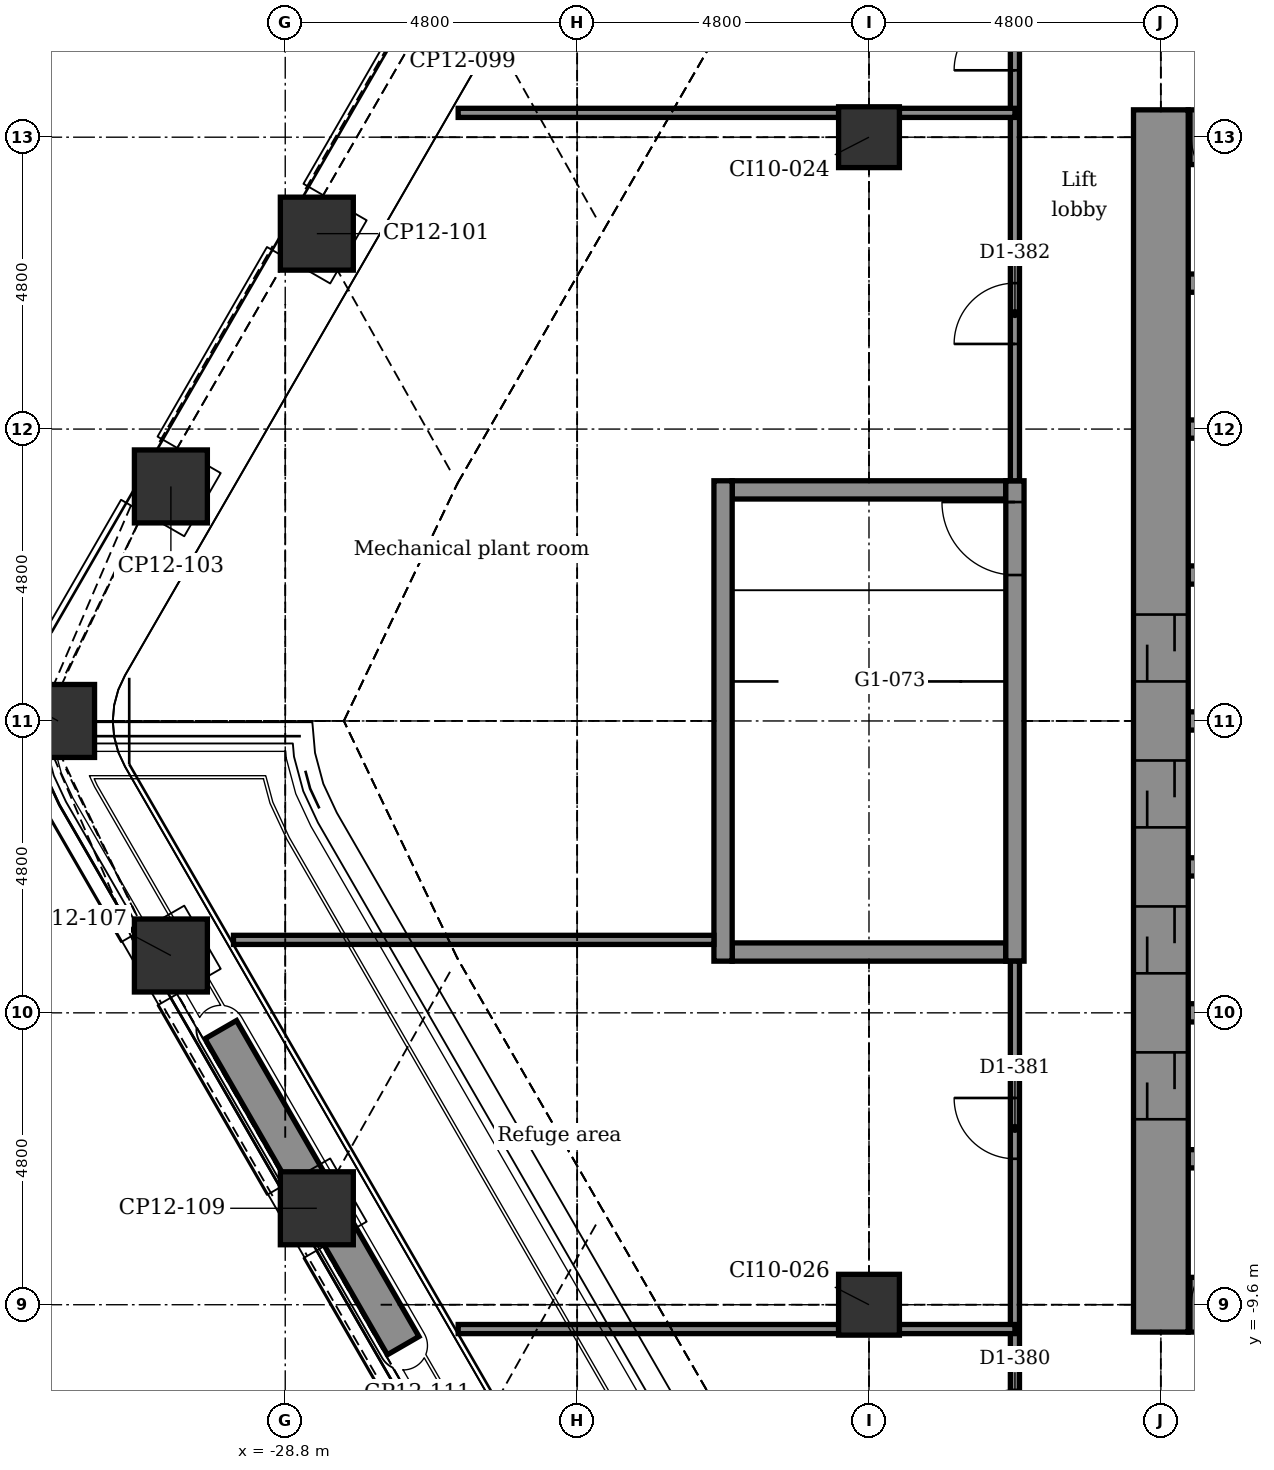
"""IFC4 building model, lengths in metres.
Left out: names, types, materials, properties, quantities, classifications, styles, units other than length and angle.
Written with IfcOpenShell. Run it as: python <this file> out.ifc"""

import sys

from ifc_helpers import new_model, si_unit, direction, frame, frame_2d, origin, origin_2d, place, context, subcontext, project, spatial, rectangle, extrude, element, fill, save


model = new_model("IFC4")
c1 = context("Model", 3, precision=1e-05, world=origin(), true_north=direction((0.0, 1.0)))
c2 = subcontext(c1, "Body", "Model", "MODEL_VIEW")
j1 = project(units=[si_unit("LENGTHUNIT", "METRE"), si_unit("PLANEANGLEUNIT", "RADIAN")], contexts=[c1])
p1 = place(None, origin())
s1 = spatial("IfcSite", under=j1, at=p1, CompositionType="ELEMENT")
p2 = place(p1, origin())
s2 = spatial("IfcBuilding", under=s1, at=p2, CompositionType="ELEMENT")
p3 = place(p2, frame((0.0, 0.0, 127.4)))
s3 = spatial("IfcBuildingStorey", under=s2, at=p3, CompositionType="ELEMENT", Elevation=127.4)
for number, where, z_axis, x_axis in (
    (1, (-28.28, -8.014, -0.3), (0.0, 0.0, 1.0), (0.866, 0.5, 0.0)),
    (2, (-30.68, -3.857, -0.3), (0.0, 0.0, 1.0), (0.866, 0.5, 0.0)),
    (3, (-32.536, 0.0, -0.3), (0.0, 0.0, 1.0), (1.0, 0.0, 0.0)),
    (4, (-30.68, 3.857, -0.3), (0.0, 0.0, 1.0), (0.5, 0.866, 0.0)),
    (5, (-28.28, 8.014, -0.3), (0.0, 0.0, 1.0), (0.5, 0.866, 0.0)),
):
    element("IfcColumn", number, at=place(p3, frame(where, z_axis=z_axis, x_axis=x_axis)), inside=s3, PredefinedType="COLUMN", context=c2, shape_type="SweptSolid", body=[
        extrude(rectangle(XDim=1.2, YDim=1.2, at=origin_2d()), origin(), (0.0, 0.0, 1.0), 6.15),
    ])
for number, where, z_axis, x_axis in (
    (6, (-19.2, -9.6, -0.3), (0.0, 0.0, 1.0), (1.0, 0.0, 0.0)),
    (7, (-19.2, 9.6, -0.3), (0.0, 0.0, 1.0), (1.0, 0.0, 0.0)),
):
    element("IfcColumn", number, at=place(p3, frame(where, z_axis=z_axis, x_axis=x_axis)), inside=s3, PredefinedType="COLUMN", context=c2, shape_type="SweptSolid", body=[
        extrude(rectangle(XDim=1.0, YDim=1.0, at=origin_2d()), origin(), (0.0, 0.0, 1.0), 6.15),
    ])
p4 = place(p3, frame((-13.95, -9.6, -0.3), z_axis=(0.0, 0.0, 1.0), x_axis=(1.0, 0.0, 0.0)))
e8 = element("IfcWall", 8, at=p4, inside=s3, PredefinedType="SHEAR", context=c2, shape_type="SweptSolid", body=[
    extrude(rectangle(XDim=3.9, YDim=0.9, at=frame_2d((1.95, 0.0))), origin(), (0.0, 0.0, 1.0), 6.15),
])
p5 = place(p4, frame((0.05, 0.0, 0.3)))
e9 = element("IfcOpeningElement", 9, at=p5, cuts=e8, PredefinedType="OPENING", context=c2, shape_type="SweptSolid", body=[
    extrude(rectangle(XDim=0.9, YDim=2.1, at=frame_2d((0.45, 1.05))), frame((0.0, 0.46, 0.0), z_axis=(0.0, -1.0, 0.0), x_axis=(1.0, 0.0, 0.0)), (0.0, 0.0, 1.0), 0.92),
])
p6 = place(p4, frame((1.5, 0.0, 0.3)))
e10 = element("IfcOpeningElement", 10, at=p6, cuts=e8, PredefinedType="OPENING", context=c2, shape_type="SweptSolid", body=[
    extrude(rectangle(XDim=0.9, YDim=2.1, at=frame_2d((0.45, 1.05))), frame((0.0, 0.46, 0.0), z_axis=(0.0, -1.0, 0.0), x_axis=(1.0, 0.0, 0.0)), (0.0, 0.0, 1.0), 0.92),
])
p7 = place(p4, frame((2.95, 0.0, 0.3)))
e11 = element("IfcOpeningElement", 11, at=p7, cuts=e8, PredefinedType="OPENING", context=c2, shape_type="SweptSolid", body=[
    extrude(rectangle(XDim=0.9, YDim=2.1, at=frame_2d((0.45, 1.05))), frame((0.0, 0.46, 0.0), z_axis=(0.0, -1.0, 0.0), x_axis=(1.0, 0.0, 0.0)), (0.0, 0.0, 1.0), 0.92),
])
p8 = place(p3, frame((-13.95, -7.2, -0.3), z_axis=(0.0, 0.0, 1.0), x_axis=(1.0, 0.0, 0.0)))
e12 = element("IfcWall", 12, at=p8, inside=s3, PredefinedType="STANDARD", context=c2, shape_type="SweptSolid", body=[
    extrude(rectangle(XDim=3.9, YDim=0.3, at=frame_2d((1.95, 0.0))), origin(), (0.0, 0.0, 1.0), 6.15),
])
p9 = place(p3, frame((-13.95, -4.8, -0.3), z_axis=(0.0, 0.0, 1.0), x_axis=(1.0, 0.0, 0.0)))
e13 = element("IfcWall", 13, at=p9, inside=s3, PredefinedType="STANDARD", context=c2, shape_type="SweptSolid", body=[
    extrude(rectangle(XDim=3.9, YDim=0.3, at=frame_2d((1.95, 0.0))), origin(), (0.0, 0.0, 1.0), 4.7),
])
p10 = place(p3, frame((-21.45, -3.8, -0.3), z_axis=(0.0, 0.0, 1.0), x_axis=(1.0, 0.0, 0.0)))
e14 = element("IfcWall", 14, at=p10, inside=s3, PredefinedType="STANDARD", context=c2, shape_type="SweptSolid", body=[
    extrude(rectangle(XDim=4.5, YDim=0.3, at=frame_2d((2.25, 0.0))), origin(), (0.0, 0.0, 1.0), 6.15),
])
for number, where, z_axis, x_axis in (
    (15, (-13.95, -2.4, -0.3), (0.0, 0.0, 1.0), (1.0, 0.0, 0.0)),
    (16, (-13.95, 0.0, -0.3), (0.0, 0.0, 1.0), (1.0, 0.0, 0.0)),
):
    element("IfcWall", number, at=place(p3, frame(where, z_axis=z_axis, x_axis=x_axis)), inside=s3, PredefinedType="STANDARD", context=c2, shape_type="SweptSolid", body=[
        extrude(rectangle(XDim=2.8, YDim=0.3, at=frame_2d((1.4, 0.0))), origin(), (0.0, 0.0, 1.0), 4.7),
    ])
p11 = place(p3, frame((-13.95, 2.4, -0.3), z_axis=(0.0, 0.0, 1.0), x_axis=(1.0, 0.0, 0.0)))
e17 = element("IfcWall", 17, at=p11, inside=s3, PredefinedType="STANDARD", context=c2, shape_type="SweptSolid", body=[
    extrude(rectangle(XDim=2.8, YDim=0.3, at=frame_2d((1.4, 0.0))), origin(), (0.0, 0.0, 1.0), 6.15),
])
p12 = place(p3, frame((-21.45, 3.8, -0.3), z_axis=(0.0, 0.0, 1.0), x_axis=(1.0, 0.0, 0.0)))
e18 = element("IfcWall", 18, at=p12, inside=s3, PredefinedType="STANDARD", context=c2, shape_type="SweptSolid", body=[
    extrude(rectangle(XDim=4.5, YDim=0.3, at=frame_2d((2.25, 0.0))), origin(), (0.0, 0.0, 1.0), 6.15),
])
for number, where, z_axis, x_axis in (
    (19, (-13.95, 4.8, -0.3), (0.0, 0.0, 1.0), (1.0, 0.0, 0.0)),
    (20, (-13.95, 7.2, -0.3), (0.0, 0.0, 1.0), (1.0, 0.0, 0.0)),
):
    element("IfcWall", number, at=place(p3, frame(where, z_axis=z_axis, x_axis=x_axis)), inside=s3, PredefinedType="STANDARD", context=c2, shape_type="SweptSolid", body=[
        extrude(rectangle(XDim=3.9, YDim=0.3, at=frame_2d((1.95, 0.0))), origin(), (0.0, 0.0, 1.0), 6.15),
    ])
p13 = place(p3, frame((-13.95, 9.6, -0.3), z_axis=(0.0, 0.0, 1.0), x_axis=(1.0, 0.0, 0.0)))
e21 = element("IfcWall", 21, at=p13, inside=s3, PredefinedType="SHEAR", context=c2, shape_type="SweptSolid", body=[
    extrude(rectangle(XDim=3.9, YDim=0.9, at=frame_2d((1.95, 0.0))), origin(), (0.0, 0.0, 1.0), 6.15),
])
p14 = place(p13, frame((0.05, 0.0, 0.3)))
e22 = element("IfcOpeningElement", 22, at=p14, cuts=e21, PredefinedType="OPENING", context=c2, shape_type="SweptSolid", body=[
    extrude(rectangle(XDim=0.9, YDim=2.1, at=frame_2d((0.45, 1.05))), frame((0.0, 0.46, 0.0), z_axis=(0.0, -1.0, 0.0), x_axis=(1.0, 0.0, 0.0)), (0.0, 0.0, 1.0), 0.92),
])
p15 = place(p13, frame((1.5, 0.0, 0.3)))
e23 = element("IfcOpeningElement", 23, at=p15, cuts=e21, PredefinedType="OPENING", context=c2, shape_type="SweptSolid", body=[
    extrude(rectangle(XDim=0.9, YDim=2.1, at=frame_2d((0.45, 1.05))), frame((0.0, 0.46, 0.0), z_axis=(0.0, -1.0, 0.0), x_axis=(1.0, 0.0, 0.0)), (0.0, 0.0, 1.0), 0.92),
])
p16 = place(p13, frame((2.95, 0.0, 0.3)))
e24 = element("IfcOpeningElement", 24, at=p16, cuts=e21, PredefinedType="OPENING", context=c2, shape_type="SweptSolid", body=[
    extrude(rectangle(XDim=0.9, YDim=2.1, at=frame_2d((0.45, 1.05))), frame((0.0, 0.46, 0.0), z_axis=(0.0, -1.0, 0.0), x_axis=(1.0, 0.0, 0.0)), (0.0, 0.0, 1.0), 0.92),
])
p17 = place(p3, frame((-21.6, -3.95, -0.3), z_axis=(0.0, 0.0, 1.0), x_axis=(0.0, 1.0, 0.0)))
e25 = element("IfcWall", 25, at=p17, inside=s3, PredefinedType="STANDARD", context=c2, shape_type="SweptSolid", body=[
    extrude(rectangle(XDim=7.9, YDim=0.3, at=frame_2d((3.95, 0.0))), origin(), (0.0, 0.0, 1.0), 6.15),
])
p18 = place(p3, frame((-16.8, -3.95, -0.3), z_axis=(0.0, 0.0, 1.0), x_axis=(0.0, 1.0, 0.0)))
e26 = element("IfcWall", 26, at=p18, inside=s3, PredefinedType="STANDARD", context=c2, shape_type="SweptSolid", body=[
    extrude(rectangle(XDim=7.9, YDim=0.3, at=frame_2d((3.95, 0.0))), origin(), (0.0, 0.0, 1.0), 6.15),
])
p19 = place(p18, frame((6.35, 0.0, 0.3)))
e27 = element("IfcOpeningElement", 27, at=p19, cuts=e26, PredefinedType="OPENING", context=c2, shape_type="SweptSolid", body=[
    extrude(rectangle(XDim=1.2, YDim=2.1, at=frame_2d((0.6, 1.05))), frame((0.0, 0.16, 0.0), z_axis=(0.0, -1.0, 0.0), x_axis=(1.0, 0.0, 0.0)), (0.0, 0.0, 1.0), 0.32),
])
p20 = place(p3, frame((-14.4, -10.05, -0.3), z_axis=(0.0, 0.0, 1.0), x_axis=(0.0, 1.0, 0.0)))
e28 = element("IfcWall", 28, at=p20, inside=s3, PredefinedType="SHEAR", context=c2, shape_type="SweptSolid", body=[
    extrude(rectangle(XDim=20.1, YDim=0.9, at=frame_2d((10.05, 0.0))), origin(), (0.0, 0.0, 1.0), 6.15),
])
p21 = place(p20, frame((3.5, 0.0, 0.3)))
e29 = element("IfcOpeningElement", 29, at=p21, cuts=e28, PredefinedType="OPENING", context=c2, shape_type="SweptSolid", body=[
    extrude(rectangle(XDim=1.1, YDim=2.1, at=frame_2d((0.55, 1.05))), frame((0.0, 0.46, 0.0), z_axis=(0.0, -1.0, 0.0), x_axis=(1.0, 0.0, 0.0)), (0.0, 0.0, 1.0), 0.92),
])
p22 = place(p20, frame((5.9, 0.0, 0.3)))
e30 = element("IfcOpeningElement", 30, at=p22, cuts=e28, PredefinedType="OPENING", context=c2, shape_type="SweptSolid", body=[
    extrude(rectangle(XDim=1.1, YDim=2.1, at=frame_2d((0.55, 1.05))), frame((0.0, 0.46, 0.0), z_axis=(0.0, -1.0, 0.0), x_axis=(1.0, 0.0, 0.0)), (0.0, 0.0, 1.0), 0.92),
])
p23 = place(p20, frame((8.3, 0.0, 0.3)))
e31 = element("IfcOpeningElement", 31, at=p23, cuts=e28, PredefinedType="OPENING", context=c2, shape_type="SweptSolid", body=[
    extrude(rectangle(XDim=1.1, YDim=2.1, at=frame_2d((0.55, 1.05))), frame((0.0, 0.46, 0.0), z_axis=(0.0, -1.0, 0.0), x_axis=(1.0, 0.0, 0.0)), (0.0, 0.0, 1.0), 0.92),
])
p24 = place(p20, frame((10.7, 0.0, 0.3)))
e32 = element("IfcOpeningElement", 32, at=p24, cuts=e28, PredefinedType="OPENING", context=c2, shape_type="SweptSolid", body=[
    extrude(rectangle(XDim=1.1, YDim=2.1, at=frame_2d((0.55, 1.05))), frame((0.0, 0.46, 0.0), z_axis=(0.0, -1.0, 0.0), x_axis=(1.0, 0.0, 0.0)), (0.0, 0.0, 1.0), 0.92),
])
p25 = place(p3, frame((-26.861, -10.273, 6.0), z_axis=(0.0, 0.0, 1.0), x_axis=(-0.499990139034, 0.866031096941, 0.0)))
e33 = element("IfcWall", 33, at=p25, inside=s3, PredefinedType="USERDEFINED", context=c2, shape_type="SweptSolid", body=[
    extrude(rectangle(XDim=6.0, YDim=0.6, at=frame_2d((3.0, 0.0))), origin(), (0.0, 0.0, 1.0), 0.7),
])
p26 = place(p3, frame((-16.8, -13.0, 0.0), z_axis=(0.0, 0.0, 1.0), x_axis=(0.0, 1.0, 0.0)))
e34 = element("IfcWall", 34, at=p26, inside=s3, PredefinedType="PARTITIONING", context=c2, shape_type="SweptSolid", body=[
    extrude(rectangle(XDim=9.05, YDim=0.15, at=frame_2d((4.525, 0.0))), origin(), (0.0, 0.0, 1.0), 5.85),
])
p27 = place(p26, frame((1.0, 0.0, 0.0)))
e35 = element("IfcOpeningElement", 35, at=p27, cuts=e34, PredefinedType="OPENING", context=c2, shape_type="SweptSolid", body=[
    extrude(rectangle(XDim=1.0, YDim=2.1, at=frame_2d((0.5, 1.05))), frame((0.0, 0.085, 0.0), z_axis=(0.0, -1.0, 0.0), x_axis=(1.0, 0.0, 0.0)), (0.0, 0.0, 1.0), 0.17),
])
p28 = place(p26, frame((5.8, 0.0, 0.0)))
e36 = element("IfcOpeningElement", 36, at=p28, cuts=e34, PredefinedType="OPENING", context=c2, shape_type="SweptSolid", body=[
    extrude(rectangle(XDim=1.0, YDim=2.1, at=frame_2d((0.5, 1.05))), frame((0.0, 0.085, 0.0), z_axis=(0.0, -1.0, 0.0), x_axis=(1.0, 0.0, 0.0)), (0.0, 0.0, 1.0), 0.17),
])
p29 = place(p3, frame((-16.8, 3.95, 0.0), z_axis=(0.0, 0.0, 1.0), x_axis=(0.0, 1.0, 0.0)))
e37 = element("IfcWall", 37, at=p29, inside=s3, PredefinedType="PARTITIONING", context=c2, shape_type="SweptSolid", body=[
    extrude(rectangle(XDim=8.45, YDim=0.15, at=frame_2d((4.225, 0.0))), origin(), (0.0, 0.0, 1.0), 5.85),
])
p30 = place(p29, frame((2.25, 0.0, 0.0)))
e38 = element("IfcOpeningElement", 38, at=p30, cuts=e37, PredefinedType="OPENING", context=c2, shape_type="SweptSolid", body=[
    extrude(rectangle(XDim=1.0, YDim=2.1, at=frame_2d((0.5, 1.05))), frame((0.0, 0.085, 0.0), z_axis=(0.0, -1.0, 0.0), x_axis=(1.0, 0.0, 0.0)), (0.0, 0.0, 1.0), 0.17),
])
p31 = place(p29, frame((6.75, 0.0, 0.0)))
e39 = element("IfcOpeningElement", 39, at=p31, cuts=e37, PredefinedType="OPENING", context=c2, shape_type="SweptSolid", body=[
    extrude(rectangle(XDim=1.0, YDim=2.1, at=frame_2d((0.5, 1.05))), frame((0.0, 0.085, 0.0), z_axis=(0.0, -1.0, 0.0), x_axis=(1.0, 0.0, 0.0)), (0.0, 0.0, 1.0), 0.17),
])
p32 = place(p3, frame((-25.956, -10.0, 0.0), z_axis=(0.0, 0.0, 1.0), x_axis=(1.0, 0.0, 0.0)))
e40 = element("IfcWall", 40, at=p32, inside=s3, PredefinedType="PARTITIONING", context=c2, shape_type="SweptSolid", body=[
    extrude(rectangle(XDim=6.256, YDim=0.15, at=frame_2d((3.128, 0.0))), origin(), (0.0, 0.0, 1.0), 5.7),
])
p33 = place(p3, frame((-18.7, -10.0, 0.0), z_axis=(0.0, 0.0, 1.0), x_axis=(1.0, 0.0, 0.0)))
e41 = element("IfcWall", 41, at=p33, inside=s3, PredefinedType="PARTITIONING", context=c2, shape_type="SweptSolid", body=[
    extrude(rectangle(XDim=1.9, YDim=0.15, at=frame_2d((0.95, 0.0))), origin(), (0.0, 0.0, 1.0), 5.85),
])
p34 = place(p3, frame((-29.651, -3.6, 0.0), z_axis=(0.0, 0.0, 1.0), x_axis=(1.0, 0.0, 0.0)))
e42 = element("IfcWall", 42, at=p34, inside=s3, PredefinedType="PARTITIONING", context=c2, shape_type="SweptSolid", body=[
    extrude(rectangle(XDim=7.901, YDim=0.15, at=frame_2d((3.95, 0.0))), origin(), (0.0, 0.0, 1.0), 5.7),
])
p35 = place(p3, frame((-25.956, 10.0, 0.0), z_axis=(0.0, 0.0, 1.0), x_axis=(1.0, 0.0, 0.0)))
e43 = element("IfcWall", 43, at=p35, inside=s3, PredefinedType="PARTITIONING", context=c2, shape_type="SweptSolid", body=[
    extrude(rectangle(XDim=6.256, YDim=0.15, at=frame_2d((3.128, 0.0))), origin(), (0.0, 0.0, 1.0), 5.85),
])
p36 = place(p3, frame((-18.7, 10.0, 0.0), z_axis=(0.0, 0.0, 1.0), x_axis=(1.0, 0.0, 0.0)))
e44 = element("IfcWall", 44, at=p36, inside=s3, PredefinedType="PARTITIONING", context=c2, shape_type="SweptSolid", body=[
    extrude(rectangle(XDim=1.9, YDim=0.15, at=frame_2d((0.95, 0.0))), origin(), (0.0, 0.0, 1.0), 5.85),
])
p37 = place(p28, origin())
e45 = element("IfcDoor", 45, at=p37, inside=s3, OperationType="SINGLE_SWING_RIGHT", PredefinedType="DOOR", context=c2, shape_type="SweptSolid", body=[
    extrude(rectangle(XDim=1.0, YDim=2.1, at=frame_2d((0.5, 1.05))), frame((0.0, 0.025, 0.0), z_axis=(0.0, -1.0, 0.0), x_axis=(1.0, 0.0, 0.0)), (0.0, 0.0, 1.0), 0.05),
])
fill(e36, e45)
p38 = place(p30, origin())
e46 = element("IfcDoor", 46, at=p38, inside=s3, OperationType="SINGLE_SWING_LEFT", PredefinedType="DOOR", context=c2, shape_type="SweptSolid", body=[
    extrude(rectangle(XDim=1.0, YDim=2.1, at=frame_2d((0.5, 1.05))), frame((0.0, 0.025, 0.0), z_axis=(0.0, -1.0, 0.0), x_axis=(1.0, 0.0, 0.0)), (0.0, 0.0, 1.0), 0.05),
])
fill(e38, e46)
p39 = place(p31, origin())
e47 = element("IfcDoor", 47, at=p39, inside=s3, OperationType="SINGLE_SWING_LEFT", PredefinedType="DOOR", context=c2, shape_type="SweptSolid", body=[
    extrude(rectangle(XDim=1.0, YDim=2.1, at=frame_2d((0.5, 1.05))), frame((0.0, 0.025, 0.0), z_axis=(0.0, -1.0, 0.0), x_axis=(1.0, 0.0, 0.0)), (0.0, 0.0, 1.0), 0.05),
])
fill(e39, e47)
p40 = place(p21, origin())
e48 = element("IfcDoor", 48, at=p40, inside=s3, OperationType="DOUBLE_DOOR_SLIDING", PredefinedType="DOOR", context=c2, shape_type="SweptSolid", body=[
    extrude(rectangle(XDim=1.1, YDim=2.1, at=frame_2d((0.55, 1.05))), frame((0.0, 0.025, 0.0), z_axis=(0.0, -1.0, 0.0), x_axis=(1.0, 0.0, 0.0)), (0.0, 0.0, 1.0), 0.05),
])
fill(e29, e48)
p41 = place(p22, origin())
e49 = element("IfcDoor", 49, at=p41, inside=s3, OperationType="DOUBLE_DOOR_SLIDING", PredefinedType="DOOR", context=c2, shape_type="SweptSolid", body=[
    extrude(rectangle(XDim=1.1, YDim=2.1, at=frame_2d((0.55, 1.05))), frame((0.0, 0.025, 0.0), z_axis=(0.0, -1.0, 0.0), x_axis=(1.0, 0.0, 0.0)), (0.0, 0.0, 1.0), 0.05),
])
fill(e30, e49)
p42 = place(p23, origin())
e50 = element("IfcDoor", 50, at=p42, inside=s3, OperationType="DOUBLE_DOOR_SLIDING", PredefinedType="DOOR", context=c2, shape_type="SweptSolid", body=[
    extrude(rectangle(XDim=1.1, YDim=2.1, at=frame_2d((0.55, 1.05))), frame((0.0, 0.025, 0.0), z_axis=(0.0, -1.0, 0.0), x_axis=(1.0, 0.0, 0.0)), (0.0, 0.0, 1.0), 0.05),
])
fill(e31, e50)
p43 = place(p24, origin())
e51 = element("IfcDoor", 51, at=p43, inside=s3, OperationType="DOUBLE_DOOR_SLIDING", PredefinedType="DOOR", context=c2, shape_type="SweptSolid", body=[
    extrude(rectangle(XDim=1.1, YDim=2.1, at=frame_2d((0.55, 1.05))), frame((0.0, 0.025, 0.0), z_axis=(0.0, -1.0, 0.0), x_axis=(1.0, 0.0, 0.0)), (0.0, 0.0, 1.0), 0.05),
])
fill(e32, e51)
p44 = place(p19, origin())
e52 = element("IfcDoor", 52, at=p44, inside=s3, OperationType="SINGLE_SWING_RIGHT", PredefinedType="DOOR", context=c2, shape_type="SweptSolid", body=[
    extrude(rectangle(XDim=1.2, YDim=2.1, at=frame_2d((0.6, 1.05))), frame((0.0, 0.025, 0.0), z_axis=(0.0, -1.0, 0.0), x_axis=(1.0, 0.0, 0.0)), (0.0, 0.0, 1.0), 0.05),
])
fill(e27, e52)
p45 = place(p5, origin())
e53 = element("IfcDoor", 53, at=p45, inside=s3, OperationType="SINGLE_SWING_RIGHT", PredefinedType="DOOR", context=c2, shape_type="SweptSolid", body=[
    extrude(rectangle(XDim=0.9, YDim=2.1, at=frame_2d((0.45, 1.05))), frame((0.0, 0.025, 0.0), z_axis=(0.0, -1.0, 0.0), x_axis=(1.0, 0.0, 0.0)), (0.0, 0.0, 1.0), 0.05),
])
fill(e9, e53)
p46 = place(p14, frame((0.9, 0.0, 0.0), z_axis=(0.0, 0.0, 1.0), x_axis=(-1.0, 0.0, 0.0)))
e54 = element("IfcDoor", 54, at=p46, inside=s3, OperationType="SINGLE_SWING_RIGHT", PredefinedType="DOOR", context=c2, shape_type="SweptSolid", body=[
    extrude(rectangle(XDim=0.9, YDim=2.1, at=frame_2d((0.45, 1.05))), frame((0.0, 0.025, 0.0), z_axis=(0.0, -1.0, 0.0), x_axis=(1.0, 0.0, 0.0)), (0.0, 0.0, 1.0), 0.05),
])
fill(e22, e54)
save(model, sys.argv[1])
